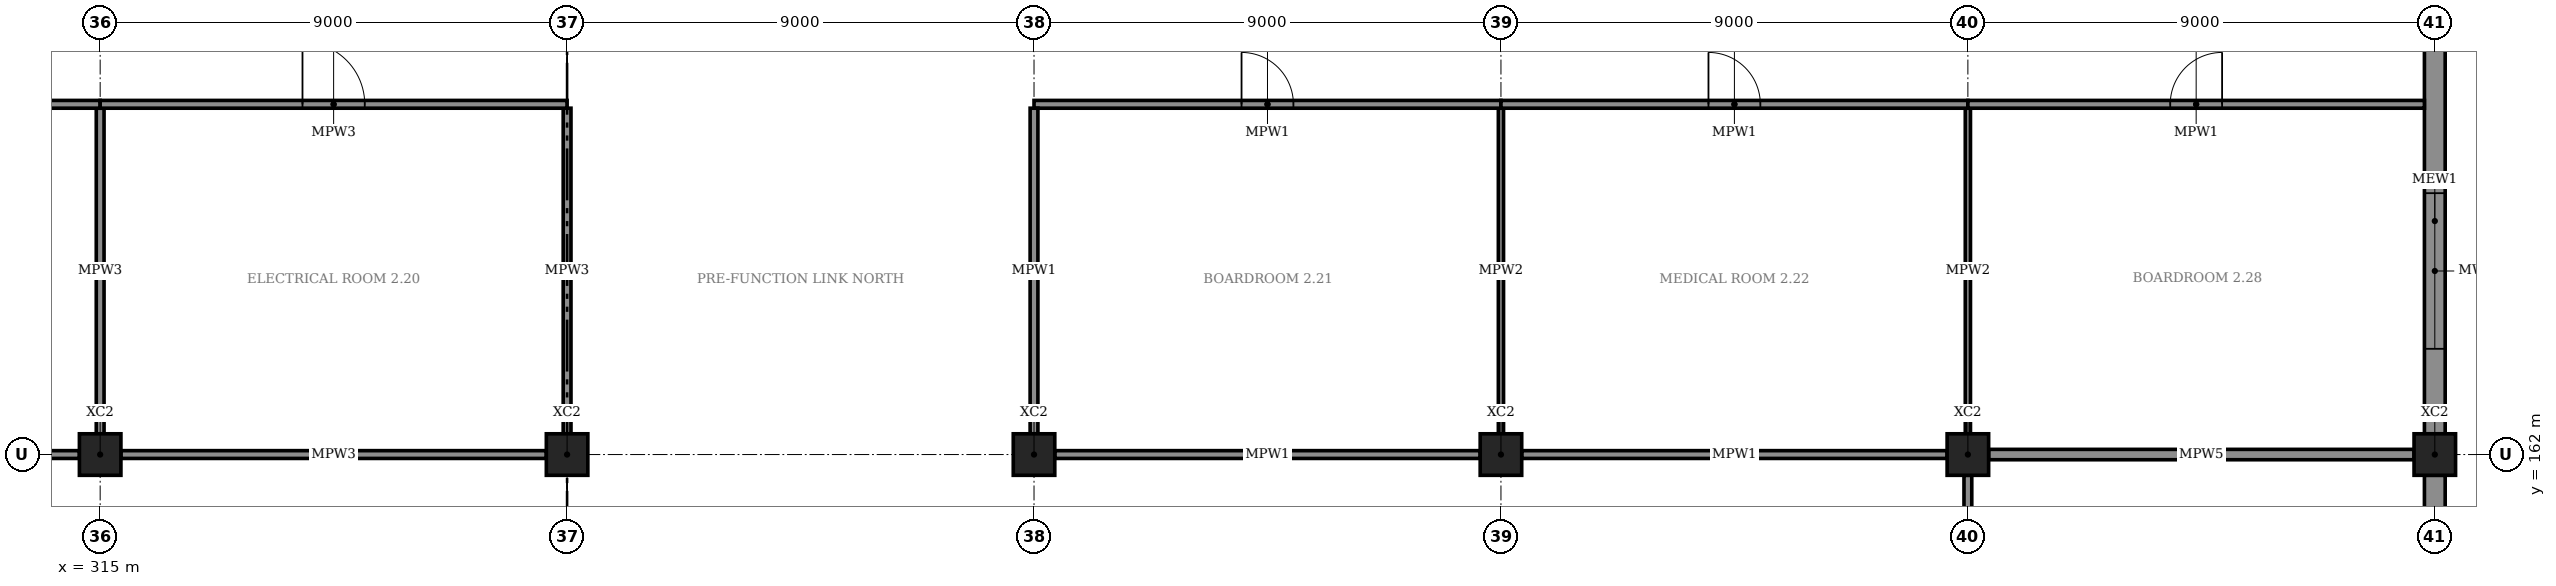
"""IFC4 building model, lengths in metres.
Left out: names, types, materials, properties, quantities, classifications, styles, units other than length and angle.
Written with IfcOpenShell. Run it as: python <this file> out.ifc"""

import sys

from ifc_helpers import new_model, si_unit, direction, frame, frame_2d, origin, origin_2d, place, context, subcontext, project, spatial, rectangle, extrude, element, fill, save


model = new_model("IFC4")
c1 = context("Model", 3, precision=1e-05, world=origin(), true_north=direction((0.0, 1.0)))
c2 = subcontext(c1, "Body", "Model", "MODEL_VIEW")
j1 = project(units=[si_unit("LENGTHUNIT", "METRE"), si_unit("PLANEANGLEUNIT", "RADIAN")], contexts=[c1])
p1 = place(None, origin())
s1 = spatial("IfcSite", under=j1, at=p1, CompositionType="ELEMENT")
p2 = place(p1, origin())
s2 = spatial("IfcBuilding", under=s1, at=p2, CompositionType="ELEMENT")
p3 = place(p2, frame((0.0, 0.0, 11.5)))
s3 = spatial("IfcBuildingStorey", under=s2, at=p3, CompositionType="ELEMENT", Elevation=11.5)
for number, where, z_axis, x_axis in (
    (1, (315.0, 162.0, 0.0), (0.0, 0.0, 1.0), (1.0, 0.0, 0.0)),
    (2, (324.0, 162.0, 0.0), (0.0, 0.0, 1.0), (1.0, 0.0, 0.0)),
    (3, (333.0, 162.0, 0.0), (0.0, 0.0, 1.0), (1.0, 0.0, 0.0)),
    (4, (342.0, 162.0, 0.0), (0.0, 0.0, 1.0), (1.0, 0.0, 0.0)),
    (5, (351.0, 162.0, 0.0), (0.0, 0.0, 1.0), (1.0, 0.0, 0.0)),
    (6, (360.0, 162.0, 0.0), (0.0, 0.0, 1.0), (1.0, 0.0, 0.0)),
):
    element("IfcColumn", number, at=place(p3, frame(where, z_axis=z_axis, x_axis=x_axis)), inside=s3, PredefinedType="COLUMN", context=c2, shape_type="SweptSolid", body=[
        extrude(rectangle(XDim=0.8, YDim=0.8, at=origin_2d()), origin(), (0.0, 0.0, 1.0), 5.5),
    ])
p4 = place(p3, frame((360.0, 153.4, 0.0), z_axis=(0.0, 0.0, 1.0), x_axis=(0.0, 1.0, 0.0)))
e7 = element("IfcWall", 7, at=p4, inside=s3, PredefinedType="STANDARD", context=c2, shape_type="SweptSolid", body=[
    extrude(rectangle(XDim=8.2, YDim=0.4, at=frame_2d((4.1, 0.0))), origin(), (0.0, 0.0, 1.0), 4.32),
])
p5 = place(p4, frame((2.6, 0.0, 0.9)))
e8 = element("IfcOpeningElement", 8, at=p5, cuts=e7, PredefinedType="OPENING", context=c2, shape_type="SweptSolid", body=[
    extrude(rectangle(XDim=3.0, YDim=2.1, at=frame_2d((1.5, 1.05))), frame((0.0, 0.21, 0.0), z_axis=(0.0, -1.0, 0.0), x_axis=(1.0, 0.0, 0.0)), (0.0, 0.0, 1.0), 0.42),
])
p6 = place(p3, frame((360.0, 162.4, 0.0), z_axis=(0.0, 0.0, 1.0), x_axis=(0.0, 1.0, 0.0)))
e9 = element("IfcWall", 9, at=p6, inside=s3, PredefinedType="STANDARD", context=c2, shape_type="SweptSolid", body=[
    extrude(rectangle(XDim=8.2, YDim=0.4, at=frame_2d((4.1, 0.0))), origin(), (0.0, 0.0, 1.0), 4.32),
])
p7 = place(p6, frame((1.638, 0.0, 0.9)))
e10 = element("IfcOpeningElement", 10, at=p7, cuts=e9, PredefinedType="OPENING", context=c2, shape_type="SweptSolid", body=[
    extrude(rectangle(XDim=3.0, YDim=2.1, at=frame_2d((1.5, 1.05))), frame((0.0, 0.21, 0.0), z_axis=(0.0, -1.0, 0.0), x_axis=(1.0, 0.0, 0.0)), (0.0, 0.0, 1.0), 0.42),
])
p8 = place(p3, frame((306.4, 162.0, 0.0), z_axis=(0.0, 0.0, 1.0), x_axis=(1.0, 0.0, 0.0)))
e11 = element("IfcWall", 11, at=p8, inside=s3, PredefinedType="PARTITIONING", context=c2, shape_type="SweptSolid", body=[
    extrude(rectangle(XDim=8.2, YDim=0.15, at=frame_2d((4.1, 0.0))), origin(), (0.0, 0.0, 1.0), 4.32),
])
p9 = place(p3, frame((297.0, 168.75, 0.0), z_axis=(0.0, 0.0, 1.0), x_axis=(1.0, 0.0, 0.0)))
e12 = element("IfcWall", 12, at=p9, inside=s3, PredefinedType="PARTITIONING", context=c2, shape_type="SweptSolid", body=[
    extrude(rectangle(XDim=18.0, YDim=0.15, at=frame_2d((9.0, 0.0))), origin(), (0.0, 0.0, 1.0), 4.32),
])
p10 = place(p9, frame((8.1, 0.0, 0.0)))
e13 = element("IfcOpeningElement", 13, at=p10, cuts=e12, PredefinedType="OPENING", context=c2, shape_type="SweptSolid", body=[
    extrude(rectangle(XDim=1.8, YDim=2.4, at=frame_2d((0.9, 1.2))), frame((0.0, 0.085, 0.0), z_axis=(0.0, -1.0, 0.0), x_axis=(1.0, 0.0, 0.0)), (0.0, 0.0, 1.0), 0.17),
])
p11 = place(p3, frame((315.0, 162.4, 0.0), z_axis=(0.0, 0.0, 1.0), x_axis=(0.0, 1.0, 0.0)))
e14 = element("IfcWall", 14, at=p11, inside=s3, PredefinedType="PARTITIONING", context=c2, shape_type="SweptSolid", body=[
    extrude(rectangle(XDim=6.275, YDim=0.15, at=frame_2d((3.138, 0.0))), origin(), (0.0, 0.0, 1.0), 4.32),
])
p12 = place(p3, frame((315.4, 162.0, 0.0), z_axis=(0.0, 0.0, 1.0), x_axis=(1.0, 0.0, 0.0)))
e15 = element("IfcWall", 15, at=p12, inside=s3, PredefinedType="PARTITIONING", context=c2, shape_type="SweptSolid", body=[
    extrude(rectangle(XDim=8.2, YDim=0.15, at=frame_2d((4.1, 0.0))), origin(), (0.0, 0.0, 1.0), 4.32),
])
p13 = place(p3, frame((315.0, 168.75, 0.0), z_axis=(0.0, 0.0, 1.0), x_axis=(1.0, 0.0, 0.0)))
e16 = element("IfcWall", 16, at=p13, inside=s3, PredefinedType="PARTITIONING", context=c2, shape_type="SweptSolid", body=[
    extrude(rectangle(XDim=9.0, YDim=0.15, at=frame_2d((4.5, 0.0))), origin(), (0.0, 0.0, 1.0), 4.32),
])
p14 = place(p13, frame((3.9, 0.0, 0.0)))
e17 = element("IfcOpeningElement", 17, at=p14, cuts=e16, PredefinedType="OPENING", context=c2, shape_type="SweptSolid", body=[
    extrude(rectangle(XDim=1.2, YDim=2.4, at=frame_2d((0.6, 1.2))), frame((0.0, 0.085, 0.0), z_axis=(0.0, -1.0, 0.0), x_axis=(1.0, 0.0, 0.0)), (0.0, 0.0, 1.0), 0.17),
])
p15 = place(p3, frame((324.0, 162.4, 0.0), z_axis=(0.0, 0.0, 1.0), x_axis=(0.0, 1.0, 0.0)))
e18 = element("IfcWall", 18, at=p15, inside=s3, PredefinedType="PARTITIONING", context=c2, shape_type="SweptSolid", body=[
    extrude(rectangle(XDim=6.275, YDim=0.15, at=frame_2d((3.138, 0.0))), origin(), (0.0, 0.0, 1.0), 4.32),
])
p16 = place(p3, frame((333.4, 162.0, 0.0), z_axis=(0.0, 0.0, 1.0), x_axis=(1.0, 0.0, 0.0)))
e19 = element("IfcWall", 19, at=p16, inside=s3, PredefinedType="PARTITIONING", context=c2, shape_type="SweptSolid", body=[
    extrude(rectangle(XDim=8.2, YDim=0.15, at=frame_2d((4.1, 0.0))), origin(), (0.0, 0.0, 1.0), 4.32),
])
p17 = place(p3, frame((333.0, 168.75, 0.0), z_axis=(0.0, 0.0, 1.0), x_axis=(1.0, 0.0, 0.0)))
e20 = element("IfcWall", 20, at=p17, inside=s3, PredefinedType="PARTITIONING", context=c2, shape_type="SweptSolid", body=[
    extrude(rectangle(XDim=9.0, YDim=0.15, at=frame_2d((4.5, 0.0))), origin(), (0.0, 0.0, 1.0), 4.32),
])
p18 = place(p17, frame((4.0, 0.0, 0.0)))
e21 = element("IfcOpeningElement", 21, at=p18, cuts=e20, PredefinedType="OPENING", context=c2, shape_type="SweptSolid", body=[
    extrude(rectangle(XDim=1.0, YDim=2.4, at=frame_2d((0.5, 1.2))), frame((0.0, 0.085, 0.0), z_axis=(0.0, -1.0, 0.0), x_axis=(1.0, 0.0, 0.0)), (0.0, 0.0, 1.0), 0.17),
])
p19 = place(p3, frame((333.0, 162.4, 0.0), z_axis=(0.0, 0.0, 1.0), x_axis=(0.0, 1.0, 0.0)))
e22 = element("IfcWall", 22, at=p19, inside=s3, PredefinedType="PARTITIONING", context=c2, shape_type="SweptSolid", body=[
    extrude(rectangle(XDim=6.275, YDim=0.15, at=frame_2d((3.138, 0.0))), origin(), (0.0, 0.0, 1.0), 4.32),
])
p20 = place(p3, frame((342.0, 162.4, 0.0), z_axis=(0.0, 0.0, 1.0), x_axis=(0.0, 1.0, 0.0)))
e23 = element("IfcWall", 23, at=p20, inside=s3, PredefinedType="PARTITIONING", context=c2, shape_type="SweptSolid", body=[
    extrude(rectangle(XDim=6.275, YDim=0.1, at=frame_2d((3.138, 0.0))), origin(), (0.0, 0.0, 1.0), 4.32),
])
p21 = place(p3, frame((342.4, 162.0, 0.0), z_axis=(0.0, 0.0, 1.0), x_axis=(1.0, 0.0, 0.0)))
e24 = element("IfcWall", 24, at=p21, inside=s3, PredefinedType="PARTITIONING", context=c2, shape_type="SweptSolid", body=[
    extrude(rectangle(XDim=8.2, YDim=0.15, at=frame_2d((4.1, 0.0))), origin(), (0.0, 0.0, 1.0), 4.32),
])
p22 = place(p3, frame((342.0, 168.75, 0.0), z_axis=(0.0, 0.0, 1.0), x_axis=(1.0, 0.0, 0.0)))
e25 = element("IfcWall", 25, at=p22, inside=s3, PredefinedType="PARTITIONING", context=c2, shape_type="SweptSolid", body=[
    extrude(rectangle(XDim=9.0, YDim=0.15, at=frame_2d((4.5, 0.0))), origin(), (0.0, 0.0, 1.0), 4.32),
])
p23 = place(p22, frame((4.0, 0.0, 0.0)))
e26 = element("IfcOpeningElement", 26, at=p23, cuts=e25, PredefinedType="OPENING", context=c2, shape_type="SweptSolid", body=[
    extrude(rectangle(XDim=1.0, YDim=2.4, at=frame_2d((0.5, 1.2))), frame((0.0, 0.085, 0.0), z_axis=(0.0, -1.0, 0.0), x_axis=(1.0, 0.0, 0.0)), (0.0, 0.0, 1.0), 0.17),
])
p24 = place(p3, frame((351.0, 162.4, 0.0), z_axis=(0.0, 0.0, 1.0), x_axis=(0.0, 1.0, 0.0)))
e27 = element("IfcWall", 27, at=p24, inside=s3, PredefinedType="PARTITIONING", context=c2, shape_type="SweptSolid", body=[
    extrude(rectangle(XDim=6.275, YDim=0.1, at=frame_2d((3.138, 0.0))), origin(), (0.0, 0.0, 1.0), 4.32),
])
p25 = place(p3, frame((351.4, 162.0, 0.0), z_axis=(0.0, 0.0, 1.0), x_axis=(1.0, 0.0, 0.0)))
e28 = element("IfcWall", 28, at=p25, inside=s3, PredefinedType="PARTITIONING", context=c2, shape_type="SweptSolid", body=[
    extrude(rectangle(XDim=8.2, YDim=0.2, at=frame_2d((4.1, 0.0))), origin(), (0.0, 0.0, 1.0), 4.32),
])
p26 = place(p3, frame((351.0, 153.4, 0.0), z_axis=(0.0, 0.0, 1.0), x_axis=(0.0, 1.0, 0.0)))
e29 = element("IfcWall", 29, at=p26, inside=s3, PredefinedType="PARTITIONING", context=c2, shape_type="SweptSolid", body=[
    extrude(rectangle(XDim=8.2, YDim=0.15, at=frame_2d((4.1, 0.0))), origin(), (0.0, 0.0, 1.0), 4.32),
])
p27 = place(p3, frame((351.0, 168.75, 0.0), z_axis=(0.0, 0.0, 1.0), x_axis=(1.0, 0.0, 0.0)))
e30 = element("IfcWall", 30, at=p27, inside=s3, PredefinedType="PARTITIONING", context=c2, shape_type="SweptSolid", body=[
    extrude(rectangle(XDim=8.8, YDim=0.15, at=frame_2d((4.4, 0.0))), origin(), (0.0, 0.0, 1.0), 4.32),
])
p28 = place(p27, frame((3.9, 0.0, 0.0)))
e31 = element("IfcOpeningElement", 31, at=p28, cuts=e30, PredefinedType="OPENING", context=c2, shape_type="SweptSolid", body=[
    extrude(rectangle(XDim=1.0, YDim=2.4, at=frame_2d((0.5, 1.2))), frame((0.0, 0.085, 0.0), z_axis=(0.0, -1.0, 0.0), x_axis=(1.0, 0.0, 0.0)), (0.0, 0.0, 1.0), 0.17),
])
p29 = place(p7, origin())
e32 = element("IfcWindow", 32, at=p29, inside=s3, PartitioningType="TRIPLE_PANEL_VERTICAL", PredefinedType="WINDOW", context=c2, shape_type="SweptSolid", body=[
    extrude(rectangle(XDim=3.0, YDim=2.1, at=frame_2d((1.5, 1.05))), frame((0.0, 0.03, 0.0), z_axis=(0.0, -1.0, 0.0), x_axis=(1.0, 0.0, 0.0)), (0.0, 0.0, 1.0), 0.06),
])
fill(e10, e32)
p30 = place(p14, origin())
e33 = element("IfcDoor", 33, at=p30, inside=s3, OperationType="SINGLE_SWING_LEFT", PredefinedType="DOOR", context=c2, shape_type="SweptSolid", body=[
    extrude(rectangle(XDim=1.2, YDim=2.4, at=frame_2d((0.6, 1.2))), frame((0.0, 0.025, 0.0), z_axis=(0.0, -1.0, 0.0), x_axis=(1.0, 0.0, 0.0)), (0.0, 0.0, 1.0), 0.05),
])
fill(e17, e33)
p31 = place(p18, origin())
e34 = element("IfcDoor", 34, at=p31, inside=s3, OperationType="SINGLE_SWING_LEFT", PredefinedType="DOOR", context=c2, shape_type="SweptSolid", body=[
    extrude(rectangle(XDim=1.0, YDim=2.4, at=frame_2d((0.5, 1.2))), frame((0.0, 0.025, 0.0), z_axis=(0.0, -1.0, 0.0), x_axis=(1.0, 0.0, 0.0)), (0.0, 0.0, 1.0), 0.05),
])
fill(e21, e34)
p32 = place(p23, origin())
e35 = element("IfcDoor", 35, at=p32, inside=s3, OperationType="SINGLE_SWING_LEFT", PredefinedType="DOOR", context=c2, shape_type="SweptSolid", body=[
    extrude(rectangle(XDim=1.0, YDim=2.4, at=frame_2d((0.5, 1.2))), frame((0.0, 0.025, 0.0), z_axis=(0.0, -1.0, 0.0), x_axis=(1.0, 0.0, 0.0)), (0.0, 0.0, 1.0), 0.05),
])
fill(e26, e35)
p33 = place(p28, origin())
e36 = element("IfcDoor", 36, at=p33, inside=s3, OperationType="SINGLE_SWING_RIGHT", PredefinedType="DOOR", context=c2, shape_type="SweptSolid", body=[
    extrude(rectangle(XDim=1.0, YDim=2.4, at=frame_2d((0.5, 1.2))), frame((0.0, 0.025, 0.0), z_axis=(0.0, -1.0, 0.0), x_axis=(1.0, 0.0, 0.0)), (0.0, 0.0, 1.0), 0.05),
])
fill(e31, e36)
save(model, sys.argv[1])
